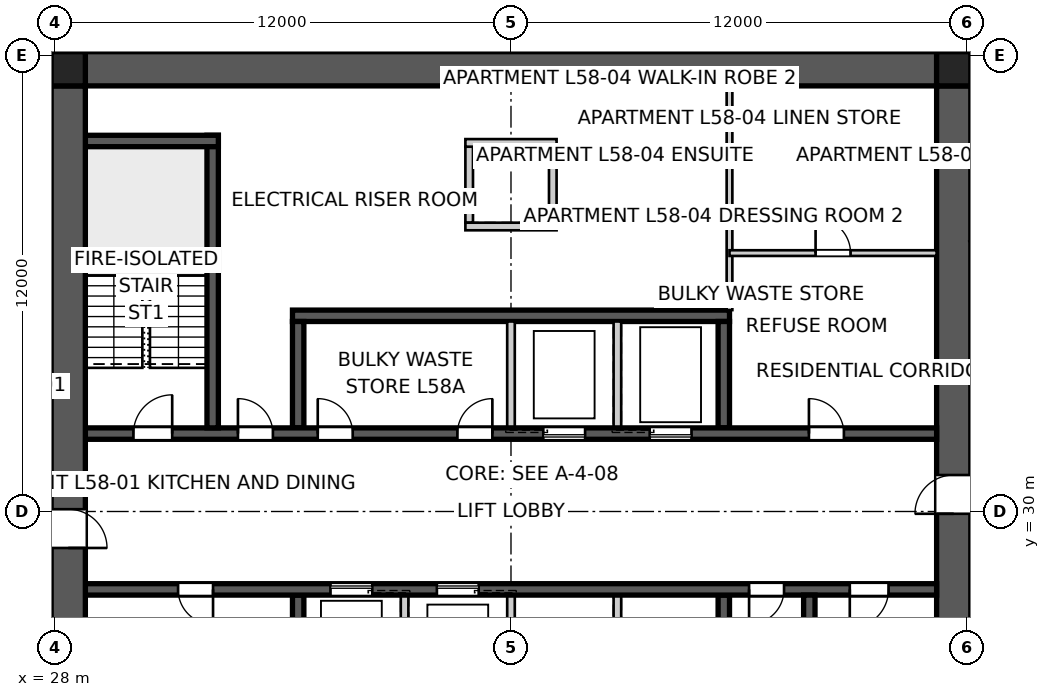
"""IFC4 building model, lengths in metres.
Left out: names, types, materials, properties, quantities, classifications, styles, units other than length and angle.
Written with IfcOpenShell. Run it as: python <this file> out.ifc"""

import sys

from ifc_helpers import new_model, si_unit, direction, frame, frame_2d, origin, origin_2d, place, context, subcontext, project, spatial, polyline, rectangle, outline, extrude, element, fill, save


model = new_model("IFC4")
c1 = context("Model", 3, precision=1e-05, world=origin(), true_north=direction((0.0, 1.0)))
c2 = subcontext(c1, "Body", "Model", "MODEL_VIEW")
j1 = project(units=[si_unit("LENGTHUNIT", "METRE"), si_unit("PLANEANGLEUNIT", "RADIAN")], contexts=[c1])
p1 = place(None, origin())
s1 = spatial("IfcSite", under=j1, at=p1, CompositionType="ELEMENT")
p2 = place(p1, origin())
s2 = spatial("IfcBuilding", under=s1, at=p2, CompositionType="ELEMENT")
p3 = place(p2, frame((0.0, 0.0, 211.6)))
s3 = spatial("IfcBuildingStorey", under=s2, at=p3, CompositionType="ELEMENT", Elevation=211.6)
p4 = place(p3, frame((28.8, 41.65, 0.0), z_axis=(0.0, 0.0, 1.0), x_axis=(1.0, 0.0, 0.0)))
e1 = element("IfcWall", 1, at=p4, inside=s3, PredefinedType="SHEAR", context=c2, shape_type="SweptSolid", body=[
    extrude(outline(polyline([(0.0, -0.45), (22.4, -0.45), (22.4, -0.025), (22.85, -0.025), (22.85, 0.025), (22.4, 0.025), (22.4, 0.45), (0.0, 0.45), (0.0, 0.025), (-0.45, 0.025), (-0.45, -0.025), (0.0, -0.025), (0.0, -0.45)])), origin(), (0.0, 0.0, 1.0), 3.4),
])
p5 = place(p3, frame((51.65, 18.8, 0.0), z_axis=(0.0, 0.0, 1.0), x_axis=(0.0, 1.0, 0.0)))
e2 = element("IfcWall", 2, at=p5, inside=s3, PredefinedType="SHEAR", context=c2, shape_type="SweptSolid", body=[
    extrude(outline(polyline([(0.0, -0.45), (22.4, -0.45), (22.4, -0.025), (22.85, -0.025), (22.85, 0.025), (22.4, 0.025), (22.4, 0.45), (0.0, 0.45), (0.0, 0.025), (-0.45, 0.025), (-0.45, -0.025), (0.0, -0.025), (0.0, -0.45)])), origin(), (0.0, 0.0, 1.0), 3.4),
])
p6 = place(p5, frame((11.14, 0.0, 0.0)))
e3 = element("IfcOpeningElement", 3, at=p6, cuts=e2, PredefinedType="OPENING", context=c2, shape_type="SweptSolid", body=[
    extrude(rectangle(XDim=1.02, YDim=2.4, at=frame_2d((0.51, 1.2))), frame((0.0, 0.46, 0.0), z_axis=(0.0, -1.0, 0.0), x_axis=(1.0, 0.0, 0.0)), (0.0, 0.0, 1.0), 0.92),
])
p7 = place(p3, frame((28.35, 41.2, 0.0), z_axis=(0.0, 0.0, 1.0), x_axis=(0.0, -1.0, 0.0)))
e4 = element("IfcWall", 4, at=p7, inside=s3, PredefinedType="SHEAR", context=c2, shape_type="SweptSolid", body=[
    extrude(outline(polyline([(0.0, -0.45), (22.4, -0.45), (22.4, -0.025), (22.85, -0.025), (22.85, 0.025), (22.4, 0.025), (22.4, 0.45), (0.0, 0.45), (0.0, 0.025), (-0.45, 0.025), (-0.45, -0.025), (0.0, -0.025), (0.0, -0.45)])), origin(), (0.0, 0.0, 1.0), 3.4),
])
p8 = place(p7, frame((11.14, 0.0, 0.0)))
e5 = element("IfcOpeningElement", 5, at=p8, cuts=e4, PredefinedType="OPENING", context=c2, shape_type="SweptSolid", body=[
    extrude(rectangle(XDim=1.02, YDim=2.4, at=frame_2d((0.51, 1.2))), frame((0.0, 0.46, 0.0), z_axis=(0.0, -1.0, 0.0), x_axis=(1.0, 0.0, 0.0)), (0.0, 0.0, 1.0), 0.92),
])
p9 = place(p3, frame((28.8, 32.05, 0.0), z_axis=(0.0, 0.0, 1.0), x_axis=(1.0, 0.0, 0.0)))
e6 = element("IfcWall", 6, at=p9, inside=s3, PredefinedType="SHEAR", context=c2, shape_type="SweptSolid", body=[
    extrude(rectangle(XDim=22.4, YDim=0.3, at=frame_2d((11.2, 0.0))), origin(), (0.0, 0.0, 1.0), 3.4),
])
p10 = place(p9, frame((19.04, 0.0, 0.0)))
e7 = element("IfcOpeningElement", 7, at=p10, cuts=e6, PredefinedType="OPENING", context=c2, shape_type="SweptSolid", body=[
    extrude(rectangle(XDim=0.92, YDim=2.1, at=frame_2d((0.46, 1.05))), frame((0.0, 0.16, 0.0), z_axis=(0.0, -1.0, 0.0), x_axis=(1.0, 0.0, 0.0)), (0.0, 0.0, 1.0), 0.32),
])
p11 = place(p9, frame((1.265, 0.0, 0.0)))
e8 = element("IfcOpeningElement", 8, at=p11, cuts=e6, PredefinedType="OPENING", context=c2, shape_type="SweptSolid", body=[
    extrude(rectangle(XDim=1.02, YDim=2.1, at=frame_2d((0.51, 1.05))), frame((0.0, 0.16, 0.0), z_axis=(0.0, -1.0, 0.0), x_axis=(1.0, 0.0, 0.0)), (0.0, 0.0, 1.0), 0.32),
])
p12 = place(p9, frame((4.015, 0.0, 0.0)))
e9 = element("IfcOpeningElement", 9, at=p12, cuts=e6, PredefinedType="OPENING", context=c2, shape_type="SweptSolid", body=[
    extrude(rectangle(XDim=0.92, YDim=2.1, at=frame_2d((0.46, 1.05))), frame((0.0, 0.16, 0.0), z_axis=(0.0, -1.0, 0.0), x_axis=(1.0, 0.0, 0.0)), (0.0, 0.0, 1.0), 0.32),
])
p13 = place(p9, frame((6.115, 0.0, 0.0)))
e10 = element("IfcOpeningElement", 10, at=p13, cuts=e6, PredefinedType="OPENING", context=c2, shape_type="SweptSolid", body=[
    extrude(rectangle(XDim=0.92, YDim=2.1, at=frame_2d((0.46, 1.05))), frame((0.0, 0.16, 0.0), z_axis=(0.0, -1.0, 0.0), x_axis=(1.0, 0.0, 0.0)), (0.0, 0.0, 1.0), 0.32),
])
p14 = place(p9, frame((9.79, 0.0, 0.0)))
e11 = element("IfcOpeningElement", 11, at=p14, cuts=e6, PredefinedType="OPENING", context=c2, shape_type="SweptSolid", body=[
    extrude(rectangle(XDim=0.92, YDim=2.1, at=frame_2d((0.46, 1.05))), frame((0.0, 0.16, 0.0), z_axis=(0.0, -1.0, 0.0), x_axis=(1.0, 0.0, 0.0)), (0.0, 0.0, 1.0), 0.32),
])
p15 = place(p9, frame((12.05, 0.0, 0.0)))
e12 = element("IfcOpeningElement", 12, at=p15, cuts=e6, PredefinedType="OPENING", context=c2, shape_type="SweptSolid", body=[
    extrude(rectangle(XDim=1.1, YDim=2.1, at=frame_2d((0.55, 1.05))), frame((0.0, 0.16, 0.0), z_axis=(0.0, -1.0, 0.0), x_axis=(1.0, 0.0, 0.0)), (0.0, 0.0, 1.0), 0.32),
])
p16 = place(p9, frame((14.85, 0.0, 0.0)))
e13 = element("IfcOpeningElement", 13, at=p16, cuts=e6, PredefinedType="OPENING", context=c2, shape_type="SweptSolid", body=[
    extrude(rectangle(XDim=1.1, YDim=2.1, at=frame_2d((0.55, 1.05))), frame((0.0, 0.16, 0.0), z_axis=(0.0, -1.0, 0.0), x_axis=(1.0, 0.0, 0.0)), (0.0, 0.0, 1.0), 0.32),
])
p17 = place(p3, frame((51.2, 27.95, 0.0), z_axis=(0.0, 0.0, 1.0), x_axis=(-1.0, 0.0, 0.0)))
e14 = element("IfcWall", 14, at=p17, inside=s3, PredefinedType="SHEAR", context=c2, shape_type="SweptSolid", body=[
    extrude(rectangle(XDim=22.4, YDim=0.3, at=frame_2d((11.2, 0.0))), origin(), (0.0, 0.0, 1.0), 3.4),
])
p18 = place(p17, frame((19.04, 0.0, 0.0)))
e15 = element("IfcOpeningElement", 15, at=p18, cuts=e14, PredefinedType="OPENING", context=c2, shape_type="SweptSolid", body=[
    extrude(rectangle(XDim=0.92, YDim=2.1, at=frame_2d((0.46, 1.05))), frame((0.0, 0.16, 0.0), z_axis=(0.0, -1.0, 0.0), x_axis=(1.0, 0.0, 0.0)), (0.0, 0.0, 1.0), 0.32),
])
p19 = place(p17, frame((1.265, 0.0, 0.0)))
e16 = element("IfcOpeningElement", 16, at=p19, cuts=e14, PredefinedType="OPENING", context=c2, shape_type="SweptSolid", body=[
    extrude(rectangle(XDim=1.02, YDim=2.1, at=frame_2d((0.51, 1.05))), frame((0.0, 0.16, 0.0), z_axis=(0.0, -1.0, 0.0), x_axis=(1.0, 0.0, 0.0)), (0.0, 0.0, 1.0), 0.32),
])
p20 = place(p17, frame((4.015, 0.0, 0.0)))
e17 = element("IfcOpeningElement", 17, at=p20, cuts=e14, PredefinedType="OPENING", context=c2, shape_type="SweptSolid", body=[
    extrude(rectangle(XDim=0.92, YDim=2.1, at=frame_2d((0.46, 1.05))), frame((0.0, 0.16, 0.0), z_axis=(0.0, -1.0, 0.0), x_axis=(1.0, 0.0, 0.0)), (0.0, 0.0, 1.0), 0.32),
])
p21 = place(p17, frame((12.05, 0.0, 0.0)))
e18 = element("IfcOpeningElement", 18, at=p21, cuts=e14, PredefinedType="OPENING", context=c2, shape_type="SweptSolid", body=[
    extrude(rectangle(XDim=1.1, YDim=2.1, at=frame_2d((0.55, 1.05))), frame((0.0, 0.16, 0.0), z_axis=(0.0, -1.0, 0.0), x_axis=(1.0, 0.0, 0.0)), (0.0, 0.0, 1.0), 0.32),
])
p22 = place(p17, frame((14.85, 0.0, 0.0)))
e19 = element("IfcOpeningElement", 19, at=p22, cuts=e14, PredefinedType="OPENING", context=c2, shape_type="SweptSolid", body=[
    extrude(rectangle(XDim=1.1, YDim=2.1, at=frame_2d((0.55, 1.05))), frame((0.0, 0.16, 0.0), z_axis=(0.0, -1.0, 0.0), x_axis=(1.0, 0.0, 0.0)), (0.0, 0.0, 1.0), 0.32),
])
p23 = place(p3, frame((34.25, 35.15, 0.0), z_axis=(0.0, 0.0, 1.0), x_axis=(1.0, 0.0, 0.0)))
e20 = element("IfcWall", 20, at=p23, inside=s3, PredefinedType="SHEAR", context=c2, shape_type="SweptSolid", body=[
    extrude(rectangle(XDim=11.5, YDim=0.3, at=frame_2d((5.75, 0.0))), origin(), (0.0, 0.0, 1.0), 3.4),
])
for number, where, z_axis, x_axis in (
    (21, (34.4, 32.2, 0.0), (0.0, 0.0, 1.0), (0.0, 1.0, 0.0)),
    (22, (45.6, 27.8, 0.0), (0.0, 0.0, 1.0), (0.0, -1.0, 0.0)),
):
    element("IfcWall", number, at=place(p3, frame(where, z_axis=z_axis, x_axis=x_axis)), inside=s3, PredefinedType="SHEAR", context=c2, shape_type="SweptSolid", body=[
        extrude(rectangle(XDim=2.8, YDim=0.3, at=frame_2d((1.4, 0.0))), origin(), (0.0, 0.0, 1.0), 3.4),
    ])
for number, where, z_axis, x_axis in (
    (23, (42.8, 27.8, 0.0), (0.0, 0.0, 1.0), (0.0, -1.0, 0.0)),
    (24, (40.0, 32.2, 0.0), (0.0, 0.0, 1.0), (0.0, 1.0, 0.0)),
    (25, (40.0, 27.8, 0.0), (0.0, 0.0, 1.0), (0.0, -1.0, 0.0)),
    (26, (42.8, 32.2, 0.0), (0.0, 0.0, 1.0), (0.0, 1.0, 0.0)),
    (27, (37.2, 27.8, 0.0), (0.0, 0.0, 1.0), (0.0, -1.0, 0.0)),
):
    element("IfcWall", number, at=place(p3, frame(where, z_axis=z_axis, x_axis=x_axis)), inside=s3, PredefinedType="SOLIDWALL", context=c2, shape_type="SweptSolid", body=[
        extrude(rectangle(XDim=2.8, YDim=0.2, at=frame_2d((1.4, 0.0))), origin(), (0.0, 0.0, 1.0), 3.4),
    ])
for number, where, z_axis, x_axis in (
    (28, (45.6, 32.2, 0.0), (0.0, 0.0, 1.0), (0.0, 1.0, 0.0)),
    (29, (34.4, 27.8, 0.0), (0.0, 0.0, 1.0), (0.0, -1.0, 0.0)),
):
    element("IfcWall", number, at=place(p3, frame(where, z_axis=z_axis, x_axis=x_axis)), inside=s3, PredefinedType="SHEAR", context=c2, shape_type="SweptSolid", body=[
        extrude(rectangle(XDim=2.8, YDim=0.3, at=frame_2d((1.4, 0.0))), origin(), (0.0, 0.0, 1.0), 3.4),
    ])
p24 = place(p3, frame((32.15, 32.2, 0.0), z_axis=(0.0, 0.0, 1.0), x_axis=(0.0, 1.0, 0.0)))
e30 = element("IfcWall", 30, at=p24, inside=s3, PredefinedType="SHEAR", context=c2, shape_type="SweptSolid", body=[
    extrude(rectangle(XDim=7.7, YDim=0.3, at=frame_2d((3.85, 0.0))), origin(), (0.0, 0.0, 1.0), 3.4),
])
p25 = place(p3, frame((28.8, 39.75, 0.0), z_axis=(0.0, 0.0, 1.0), x_axis=(1.0, 0.0, 0.0)))
e31 = element("IfcWall", 31, at=p25, inside=s3, PredefinedType="SHEAR", context=c2, shape_type="SweptSolid", body=[
    extrude(rectangle(XDim=3.5, YDim=0.3, at=frame_2d((1.75, 0.0))), origin(), (0.0, 0.0, 1.0), 3.4),
])
p26 = place(p3, frame((47.85, 27.8, 0.0), z_axis=(0.0, 0.0, 1.0), x_axis=(0.0, -1.0, 0.0)))
e32 = element("IfcWall", 32, at=p26, inside=s3, PredefinedType="SHEAR", context=c2, shape_type="SweptSolid", body=[
    extrude(rectangle(XDim=7.7, YDim=0.3, at=frame_2d((3.85, 0.0))), origin(), (0.0, 0.0, 1.0), 3.4),
])
for number, where, z_axis, x_axis in (
    (33, (38.9, 37.6, 0.0), (0.0, 0.0, 1.0), (0.0, 1.0, 0.0)),
    (34, (41.1, 37.6, 0.0), (0.0, 0.0, 1.0), (0.0, 1.0, 0.0)),
):
    element("IfcWall", number, at=place(p3, frame(where, z_axis=z_axis, x_axis=x_axis)), inside=s3, PredefinedType="SOLIDWALL", context=c2, shape_type="SweptSolid", body=[
        extrude(rectangle(XDim=2.0, YDim=0.2, at=frame_2d((1.0, 0.0))), origin(), (0.0, 0.0, 1.0), 3.4),
    ])
for number, where, z_axis, x_axis in (
    (35, (38.8, 37.5, 0.0), (0.0, 0.0, 1.0), (1.0, 0.0, 0.0)),
    (36, (38.8, 39.7, 0.0), (0.0, 0.0, 1.0), (1.0, 0.0, 0.0)),
):
    element("IfcWall", number, at=place(p3, frame(where, z_axis=z_axis, x_axis=x_axis)), inside=s3, PredefinedType="SOLIDWALL", context=c2, shape_type="SweptSolid", body=[
        extrude(rectangle(XDim=2.4, YDim=0.2, at=frame_2d((1.2, 0.0))), origin(), (0.0, 0.0, 1.0), 3.4),
    ])
for number, where, z_axis, x_axis in (
    (37, (51.65, 41.65, 0.0), (0.0, 0.0, 1.0), (1.0, 0.0, 0.0)),
    (38, (28.35, 41.65, 0.0), (0.0, 0.0, 1.0), (1.0, 0.0, 0.0)),
):
    element("IfcColumn", number, at=place(p3, frame(where, z_axis=z_axis, x_axis=x_axis)), inside=s3, PredefinedType="COLUMN", context=c2, shape_type="SweptSolid", body=[
        extrude(rectangle(XDim=0.9, YDim=0.9, at=origin_2d()), origin(), (0.0, 0.0, 1.0), 3.4),
    ])
p27 = place(p3, frame((59.486, 41.25, 0.0), z_axis=(0.0, 0.0, 1.0), x_axis=(-0.866020489494, -0.500008511703, 0.0)))
e39 = element("IfcWall", 39, at=p27, inside=s3, PredefinedType="PARTITIONING", context=c2, shape_type="SweptSolid", body=[
    extrude(rectangle(XDim=8.496, YDim=0.25, at=frame_2d((4.248, 0.0))), origin(), (0.0, 0.0, 1.0), 3.25),
])
p28 = place(p3, frame((45.75, 41.2, 0.0), z_axis=(0.0, 0.0, 1.0), x_axis=(0.0, -1.0, 0.0)))
e40 = element("IfcWall", 40, at=p28, inside=s3, PredefinedType="SOLIDWALL", context=c2, shape_type="SweptSolid", body=[
    extrude(rectangle(XDim=5.9, YDim=0.15, at=frame_2d((2.95, 0.0))), origin(), (0.0, 0.0, 1.0), 3.25),
])
p29 = place(p3, frame((45.75, 36.8, 0.0), z_axis=(0.0, 0.0, 1.0), x_axis=(1.0, 0.0, 0.0)))
e41 = element("IfcWall", 41, at=p29, inside=s3, PredefinedType="SOLIDWALL", context=c2, shape_type="SweptSolid", body=[
    extrude(rectangle(XDim=5.45, YDim=0.15, at=frame_2d((2.725, 0.0))), origin(), (0.0, 0.0, 1.0), 3.25),
])
p30 = place(p29, frame((2.265, 0.0, 0.0)))
e42 = element("IfcOpeningElement", 42, at=p30, cuts=e41, PredefinedType="OPENING", context=c2, shape_type="SweptSolid", body=[
    extrude(rectangle(XDim=0.92, YDim=2.1, at=frame_2d((0.46, 1.05))), frame((0.0, 0.085, 0.0), z_axis=(0.0, -1.0, 0.0), x_axis=(1.0, 0.0, 0.0)), (0.0, 0.0, 1.0), 0.17),
])
p31 = place(p3, frame((51.782, 41.18, 0.0), z_axis=(0.0, 0.0, 1.0), x_axis=(0.0, 1.0, 0.0)))
e43 = element("IfcWall", 43, at=p31, inside=s3, PredefinedType="PARTITIONING", context=c2, shape_type="SweptSolid", body=[
    extrude(rectangle(XDim=5.82, YDim=0.12, at=frame_2d((2.91, 0.0))), origin(), (0.0, 0.0, 1.0), 3.25),
])
p32 = place(p31, frame((3.178, 0.0, 0.0)))
e44 = element("IfcOpeningElement", 44, at=p32, cuts=e43, PredefinedType="OPENING", context=c2, shape_type="SweptSolid", body=[
    extrude(rectangle(XDim=0.96, YDim=2.1, at=frame_2d((0.48, 1.05))), frame((0.0, 0.07, 0.0), z_axis=(0.0, -1.0, 0.0), x_axis=(1.0, 0.0, 0.0)), (0.0, 0.0, 1.0), 0.14),
])
p33 = place(p3, frame((27.9, 41.687, 0.0), z_axis=(0.0, 0.0, 1.0), x_axis=(0.999162409553, -0.040920402453, 0.0)))
e45 = element("IfcWall", 45, at=p33, inside=s3, PredefinedType="PARTITIONING", context=c2, shape_type="SweptSolid", body=[
    extrude(rectangle(XDim=0.901, YDim=0.12, at=frame_2d((0.45, 0.0))), origin(), (0.0, 0.0, 1.0), 3.25),
])
p34 = place(p10, origin())
e46 = element("IfcDoor", 46, at=p34, inside=s3, OperationType="SINGLE_SWING_LEFT", PredefinedType="DOOR", context=c2, shape_type="SweptSolid", body=[
    extrude(rectangle(XDim=0.92, YDim=2.1, at=frame_2d((0.46, 1.05))), frame((0.0, 0.025, 0.0), z_axis=(0.0, -1.0, 0.0), x_axis=(1.0, 0.0, 0.0)), (0.0, 0.0, 1.0), 0.05),
])
fill(e7, e46)
p35 = place(p18, origin())
e47 = element("IfcDoor", 47, at=p35, inside=s3, OperationType="SINGLE_SWING_LEFT", PredefinedType="DOOR", context=c2, shape_type="SweptSolid", body=[
    extrude(rectangle(XDim=0.92, YDim=2.1, at=frame_2d((0.46, 1.05))), frame((0.0, 0.025, 0.0), z_axis=(0.0, -1.0, 0.0), x_axis=(1.0, 0.0, 0.0)), (0.0, 0.0, 1.0), 0.05),
])
fill(e15, e47)
p36 = place(p19, origin())
e48 = element("IfcDoor", 48, at=p36, inside=s3, OperationType="SINGLE_SWING_RIGHT", PredefinedType="DOOR", context=c2, shape_type="SweptSolid", body=[
    extrude(rectangle(XDim=1.02, YDim=2.1, at=frame_2d((0.51, 1.05))), frame((0.0, 0.025, 0.0), z_axis=(0.0, -1.0, 0.0), x_axis=(1.0, 0.0, 0.0)), (0.0, 0.0, 1.0), 0.05),
])
fill(e16, e48)
p37 = place(p11, origin())
e49 = element("IfcDoor", 49, at=p37, inside=s3, OperationType="SINGLE_SWING_RIGHT", PredefinedType="DOOR", context=c2, shape_type="SweptSolid", body=[
    extrude(rectangle(XDim=1.02, YDim=2.1, at=frame_2d((0.51, 1.05))), frame((0.0, 0.025, 0.0), z_axis=(0.0, -1.0, 0.0), x_axis=(1.0, 0.0, 0.0)), (0.0, 0.0, 1.0), 0.05),
])
fill(e8, e49)
p38 = place(p12, origin())
e50 = element("IfcDoor", 50, at=p38, inside=s3, OperationType="SINGLE_SWING_LEFT", PredefinedType="DOOR", context=c2, shape_type="SweptSolid", body=[
    extrude(rectangle(XDim=0.92, YDim=2.1, at=frame_2d((0.46, 1.05))), frame((0.0, 0.025, 0.0), z_axis=(0.0, -1.0, 0.0), x_axis=(1.0, 0.0, 0.0)), (0.0, 0.0, 1.0), 0.05),
])
fill(e9, e50)
p39 = place(p20, origin())
e51 = element("IfcDoor", 51, at=p39, inside=s3, OperationType="SINGLE_SWING_RIGHT", PredefinedType="DOOR", context=c2, shape_type="SweptSolid", body=[
    extrude(rectangle(XDim=0.92, YDim=2.1, at=frame_2d((0.46, 1.05))), frame((0.0, 0.025, 0.0), z_axis=(0.0, -1.0, 0.0), x_axis=(1.0, 0.0, 0.0)), (0.0, 0.0, 1.0), 0.05),
])
fill(e17, e51)
p40 = place(p30, origin())
e52 = element("IfcDoor", 52, at=p40, inside=s3, OperationType="SINGLE_SWING_LEFT", PredefinedType="DOOR", context=c2, shape_type="SweptSolid", body=[
    extrude(rectangle(XDim=0.92, YDim=2.1, at=frame_2d((0.46, 1.05))), frame((0.0, 0.025, 0.0), z_axis=(0.0, -1.0, 0.0), x_axis=(1.0, 0.0, 0.0)), (0.0, 0.0, 1.0), 0.05),
])
fill(e42, e52)
p41 = place(p13, origin())
e53 = element("IfcDoor", 53, at=p41, inside=s3, OperationType="SINGLE_SWING_LEFT", PredefinedType="DOOR", context=c2, shape_type="SweptSolid", body=[
    extrude(rectangle(XDim=0.92, YDim=2.1, at=frame_2d((0.46, 1.05))), frame((0.0, 0.025, 0.0), z_axis=(0.0, -1.0, 0.0), x_axis=(1.0, 0.0, 0.0)), (0.0, 0.0, 1.0), 0.05),
])
fill(e10, e53)
p42 = place(p14, origin())
e54 = element("IfcDoor", 54, at=p42, inside=s3, OperationType="SINGLE_SWING_RIGHT", PredefinedType="DOOR", context=c2, shape_type="SweptSolid", body=[
    extrude(rectangle(XDim=0.92, YDim=2.1, at=frame_2d((0.46, 1.05))), frame((0.0, 0.025, 0.0), z_axis=(0.0, -1.0, 0.0), x_axis=(1.0, 0.0, 0.0)), (0.0, 0.0, 1.0), 0.05),
])
fill(e11, e54)
p43 = place(p6, origin())
e55 = element("IfcDoor", 55, at=p43, inside=s3, OperationType="SINGLE_SWING_LEFT", PredefinedType="DOOR", context=c2, shape_type="SweptSolid", body=[
    extrude(rectangle(XDim=1.02, YDim=2.4, at=frame_2d((0.51, 1.2))), frame((0.0, 0.025, 0.0), z_axis=(0.0, -1.0, 0.0), x_axis=(1.0, 0.0, 0.0)), (0.0, 0.0, 1.0), 0.05),
])
fill(e3, e55)
p44 = place(p8, origin())
e56 = element("IfcDoor", 56, at=p44, inside=s3, OperationType="SINGLE_SWING_RIGHT", PredefinedType="DOOR", context=c2, shape_type="SweptSolid", body=[
    extrude(rectangle(XDim=1.02, YDim=2.4, at=frame_2d((0.51, 1.2))), frame((0.0, 0.025, 0.0), z_axis=(0.0, -1.0, 0.0), x_axis=(1.0, 0.0, 0.0)), (0.0, 0.0, 1.0), 0.05),
])
fill(e5, e56)
p45 = place(p15, origin())
e57 = element("IfcDoor", 57, at=p45, inside=s3, OperationType="SLIDING_TO_LEFT", PredefinedType="DOOR", context=c2, shape_type="SweptSolid", body=[
    extrude(rectangle(XDim=1.1, YDim=2.1, at=frame_2d((0.55, 1.05))), frame((0.0, 0.025, 0.0), z_axis=(0.0, -1.0, 0.0), x_axis=(1.0, 0.0, 0.0)), (0.0, 0.0, 1.0), 0.05),
])
fill(e12, e57)
p46 = place(p21, origin())
e58 = element("IfcDoor", 58, at=p46, inside=s3, OperationType="SLIDING_TO_LEFT", PredefinedType="DOOR", context=c2, shape_type="SweptSolid", body=[
    extrude(rectangle(XDim=1.1, YDim=2.1, at=frame_2d((0.55, 1.05))), frame((0.0, 0.025, 0.0), z_axis=(0.0, -1.0, 0.0), x_axis=(1.0, 0.0, 0.0)), (0.0, 0.0, 1.0), 0.05),
])
fill(e18, e58)
p47 = place(p16, origin())
e59 = element("IfcDoor", 59, at=p47, inside=s3, OperationType="SLIDING_TO_LEFT", PredefinedType="DOOR", context=c2, shape_type="SweptSolid", body=[
    extrude(rectangle(XDim=1.1, YDim=2.1, at=frame_2d((0.55, 1.05))), frame((0.0, 0.025, 0.0), z_axis=(0.0, -1.0, 0.0), x_axis=(1.0, 0.0, 0.0)), (0.0, 0.0, 1.0), 0.05),
])
fill(e13, e59)
p48 = place(p22, origin())
e60 = element("IfcDoor", 60, at=p48, inside=s3, OperationType="SLIDING_TO_LEFT", PredefinedType="DOOR", context=c2, shape_type="SweptSolid", body=[
    extrude(rectangle(XDim=1.1, YDim=2.1, at=frame_2d((0.55, 1.05))), frame((0.0, 0.025, 0.0), z_axis=(0.0, -1.0, 0.0), x_axis=(1.0, 0.0, 0.0)), (0.0, 0.0, 1.0), 0.05),
])
fill(e19, e60)
save(model, sys.argv[1])
